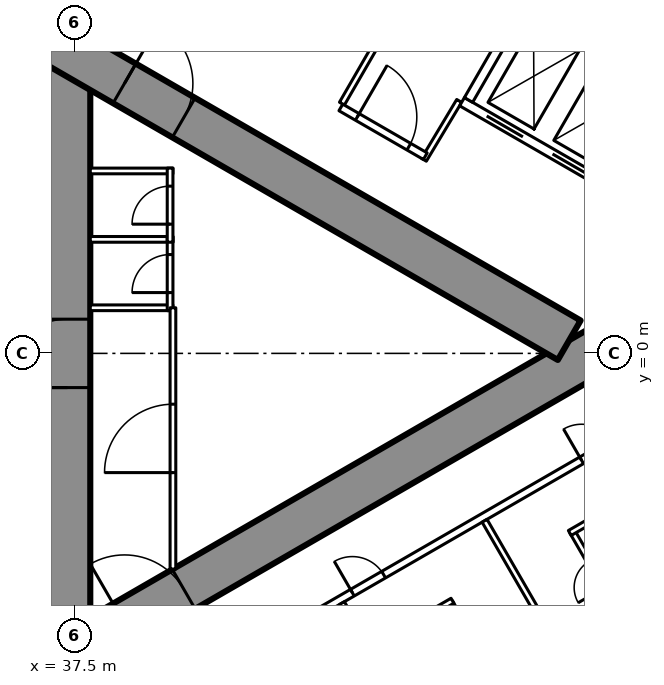
"""IFC4 building model, lengths in metres.
Left out: names, types, materials, properties, quantities, classifications, styles, units other than length and angle.
Written with IfcOpenShell. Run it as: python <this file> out.ifc"""

import sys

from ifc_helpers import new_model, si_unit, direction, frame, frame_2d, origin, place, context, subcontext, project, spatial, rectangle, extrude, element, fill, save


model = new_model("IFC4")
c1 = context("Model", 3, precision=1e-05, world=origin(), true_north=direction((0.0, 1.0)))
c2 = subcontext(c1, "Body", "Model", "MODEL_VIEW")
j1 = project(units=[si_unit("LENGTHUNIT", "METRE"), si_unit("PLANEANGLEUNIT", "RADIAN")], contexts=[c1])
p1 = place(None, origin())
s1 = spatial("IfcSite", under=j1, at=p1, CompositionType="ELEMENT")
p2 = place(p1, origin())
s2 = spatial("IfcBuilding", under=s1, at=p2, CompositionType="ELEMENT")
p3 = place(p2, frame((0.0, 0.0, 194.8)))
s3 = spatial("IfcBuildingStorey", under=s2, at=p3, CompositionType="ELEMENT", Elevation=194.8)
p4 = place(p3, frame((37.3, -8.6, 0.0), z_axis=(0.0, 0.0, 1.0), x_axis=(0.0, 1.0, 0.0)))
e1 = element("IfcWall", 1, at=p4, inside=s3, PredefinedType="SHEAR", context=c2, shape_type="SweptSolid", body=[
    extrude(rectangle(XDim=17.2, YDim=1.2, at=frame_2d((8.6, 0.0))), origin(), (0.0, 0.0, 1.0), 3.5),
])
p5 = place(p4, frame((7.7, 0.0, 0.0)))
e2 = element("IfcOpeningElement", 2, at=p5, cuts=e1, PredefinedType="OPENING", context=c2, shape_type="SweptSolid", body=[
    extrude(rectangle(XDim=1.8, YDim=2.2, at=frame_2d((0.9, 1.1))), frame((0.0, 0.61, 0.0), z_axis=(0.0, -1.0, 0.0), x_axis=(1.0, 0.0, 0.0)), (0.0, 0.0, 1.0), 1.22),
])
p6 = place(p3, frame((27.2, -13.8, 0.0), z_axis=(0.0, 0.0, 1.0), x_axis=(0.866027159892, 0.499996958321, 0.0)))
e3 = element("IfcWall", 3, at=p6, inside=s3, PredefinedType="SHEAR", context=c2, shape_type="SweptSolid", body=[
    extrude(rectangle(XDim=27.947, YDim=1.2, at=frame_2d((13.973, 0.0))), origin(), (0.0, 0.0, 1.0), 3.5),
])
p7 = place(p6, frame((4.6, 0.0, 0.0)))
e4 = element("IfcOpeningElement", 4, at=p7, cuts=e3, PredefinedType="OPENING", context=c2, shape_type="SweptSolid", body=[
    extrude(rectangle(XDim=1.0, YDim=2.2, at=frame_2d((0.5, 1.1))), frame((0.0, 0.61, 0.0), z_axis=(0.0, -1.0, 0.0), x_axis=(1.0, 0.0, 0.0)), (0.0, 0.0, 1.0), 1.22),
])
p8 = place(p6, frame((13.395, 0.0, 0.0)))
e5 = element("IfcOpeningElement", 5, at=p8, cuts=e3, PredefinedType="OPENING", context=c2, shape_type="SweptSolid", body=[
    extrude(rectangle(XDim=1.8, YDim=2.2, at=frame_2d((0.9, 1.1))), frame((0.0, 0.61, 0.0), z_axis=(0.0, -1.0, 0.0), x_axis=(1.0, 0.0, 0.0)), (0.0, 0.0, 1.0), 1.22),
])
p9 = place(p3, frame((27.2, 13.8, 0.0), z_axis=(0.0, 0.0, 1.0), x_axis=(0.866024515034, -0.500001539357, 0.0)))
e6 = element("IfcWall", 6, at=p9, inside=s3, PredefinedType="SHEAR", context=c2, shape_type="SweptSolid", body=[
    extrude(rectangle(XDim=26.907, YDim=1.2, at=frame_2d((13.454, 0.0))), origin(), (0.0, 0.0, 1.0), 3.5),
])
p10 = place(p9, frame((4.6, 0.0, 0.0)))
e7 = element("IfcOpeningElement", 7, at=p10, cuts=e6, PredefinedType="OPENING", context=c2, shape_type="SweptSolid", body=[
    extrude(rectangle(XDim=1.0, YDim=2.2, at=frame_2d((0.5, 1.1))), frame((0.0, 0.61, 0.0), z_axis=(0.0, -1.0, 0.0), x_axis=(1.0, 0.0, 0.0)), (0.0, 0.0, 1.0), 1.22),
])
p11 = place(p9, frame((13.395, 0.0, 0.0)))
e8 = element("IfcOpeningElement", 8, at=p11, cuts=e6, PredefinedType="OPENING", context=c2, shape_type="SweptSolid", body=[
    extrude(rectangle(XDim=1.8, YDim=2.2, at=frame_2d((0.9, 1.1))), frame((0.0, 0.61, 0.0), z_axis=(0.0, -1.0, 0.0), x_axis=(1.0, 0.0, 0.0)), (0.0, 0.0, 1.0), 1.22),
])
p12 = place(p3, frame((27.959, -16.017, 0.0), z_axis=(0.0, 0.0, 1.0), x_axis=(0.866024151371, 0.500002169237, 0.0)))
e9 = element("IfcWall", 9, at=p12, inside=s3, PredefinedType="PARTITIONING", context=c2, shape_type="SweptSolid", body=[
    extrude(rectangle(XDim=32.034, YDim=0.2, at=frame_2d((16.017, 0.0))), origin(), (0.0, 0.0, 1.0), 3.25),
])
p13 = place(p12, frame((0.6, 0.0, 0.0)))
e10 = element("IfcOpeningElement", 10, at=p13, cuts=e9, PredefinedType="OPENING", context=c2, shape_type="SweptSolid", body=[
    extrude(rectangle(XDim=0.95, YDim=2.2, at=frame_2d((0.475, 1.1))), frame((0.0, 0.11, 0.0), z_axis=(0.0, -1.0, 0.0), x_axis=(1.0, 0.0, 0.0)), (0.0, 0.0, 1.0), 0.22),
])
p14 = place(p12, frame((13.132, 0.0, 0.0)))
e11 = element("IfcOpeningElement", 11, at=p14, cuts=e9, PredefinedType="OPENING", context=c2, shape_type="SweptSolid", body=[
    extrude(rectangle(XDim=0.95, YDim=2.2, at=frame_2d((0.475, 1.1))), frame((0.0, 0.11, 0.0), z_axis=(0.0, -1.0, 0.0), x_axis=(1.0, 0.0, 0.0)), (0.0, 0.0, 1.0), 0.22),
])
p15 = place(p12, frame((15.391, 0.0, 0.0)))
e12 = element("IfcOpeningElement", 12, at=p15, cuts=e9, PredefinedType="OPENING", context=c2, shape_type="SweptSolid", body=[
    extrude(rectangle(XDim=0.95, YDim=2.2, at=frame_2d((0.475, 1.1))), frame((0.0, 0.11, 0.0), z_axis=(0.0, -1.0, 0.0), x_axis=(1.0, 0.0, 0.0)), (0.0, 0.0, 1.0), 0.22),
])
p16 = place(p12, frame((19.441, 0.0, 0.0)))
e13 = element("IfcOpeningElement", 13, at=p16, cuts=e9, PredefinedType="OPENING", context=c2, shape_type="SweptSolid", body=[
    extrude(rectangle(XDim=0.95, YDim=2.2, at=frame_2d((0.475, 1.1))), frame((0.0, 0.11, 0.0), z_axis=(0.0, -1.0, 0.0), x_axis=(1.0, 0.0, 0.0)), (0.0, 0.0, 1.0), 0.22),
])
p17 = place(p12, frame((26.406, 0.0, 0.0)))
e14 = element("IfcOpeningElement", 14, at=p17, cuts=e9, PredefinedType="OPENING", context=c2, shape_type="SweptSolid", body=[
    extrude(rectangle(XDim=0.95, YDim=2.2, at=frame_2d((0.475, 1.1))), frame((0.0, 0.11, 0.0), z_axis=(0.0, -1.0, 0.0), x_axis=(1.0, 0.0, 0.0)), (0.0, 0.0, 1.0), 0.22),
])
p18 = place(p12, frame((28.87, 0.0, 0.0)))
e15 = element("IfcOpeningElement", 15, at=p18, cuts=e9, PredefinedType="OPENING", context=c2, shape_type="SweptSolid", body=[
    extrude(rectangle(XDim=1.8, YDim=2.2, at=frame_2d((0.9, 1.1))), frame((0.0, 0.11, 0.0), z_axis=(0.0, -1.0, 0.0), x_axis=(1.0, 0.0, 0.0)), (0.0, 0.0, 1.0), 0.22),
])
p19 = place(p3, frame((44.521, -6.571, 0.0), z_axis=(0.0, 0.0, 1.0), x_axis=(0.500010457486, -0.866019366068, 0.0)))
e16 = element("IfcWall", 16, at=p19, inside=s3, PredefinedType="PARTITIONING", context=c2, shape_type="SweptSolid", body=[
    extrude(rectangle(XDim=10.126, YDim=0.15, at=frame_2d((5.063, 0.0))), origin(), (0.0, 0.0, 1.0), 3.25),
])
p20 = place(p3, frame((48.275, -4.404, 0.0), z_axis=(0.0, 0.0, 1.0), x_axis=(0.500006004368, -0.866021937133, 0.0)))
e17 = element("IfcWall", 17, at=p20, inside=s3, PredefinedType="PARTITIONING", context=c2, shape_type="SweptSolid", body=[
    extrude(rectangle(XDim=7.279, YDim=0.15, at=frame_2d((3.64, 0.0))), origin(), (0.0, 0.0, 1.0), 2.3),
])
p21 = place(p3, frame((44.521, 6.571, 0.0), z_axis=(0.0, 0.0, 1.0), x_axis=(0.500020376429, 0.866013639128, 0.0)))
e18 = element("IfcWall", 18, at=p21, inside=s3, PredefinedType="PARTITIONING", context=c2, shape_type="SweptSolid", body=[
    extrude(rectangle(XDim=7.306, YDim=0.15, at=frame_2d((3.653, 0.0))), origin(), (0.0, 0.0, 1.0), 2.3),
])
p22 = place(p3, frame((47.606, 6.643, 0.0), z_axis=(0.0, 0.0, 1.0), x_axis=(-0.514237157483, -0.857648031458, 0.0)))
e19 = element("IfcWall", 19, at=p22, inside=s3, PredefinedType="PARTITIONING", context=c2, shape_type="SweptSolid", body=[
    extrude(rectangle(XDim=1.805, YDim=0.15, at=frame_2d((0.902, 0.0))), origin(), (0.0, 0.0, 1.0), 3.25),
])
p23 = place(p3, frame((44.493, 6.472, 0.0), z_axis=(0.0, 0.0, 1.0), x_axis=(0.866027140358, -0.499996992154, 0.0)))
e20 = element("IfcWall", 20, at=p23, inside=s3, PredefinedType="PARTITIONING", context=c2, shape_type="SweptSolid", body=[
    extrude(rectangle(XDim=2.566, YDim=0.2, at=frame_2d((1.283, 0.0))), origin(), (0.0, 0.0, 1.0), 3.25),
])
p24 = place(p23, frame((0.5, 0.0, 0.0)))
e21 = element("IfcOpeningElement", 21, at=p24, cuts=e20, PredefinedType="OPENING", context=c2, shape_type="SweptSolid", body=[
    extrude(rectangle(XDim=1.566, YDim=2.2, at=frame_2d((0.783, 1.1))), frame((0.0, 0.11, 0.0), z_axis=(0.0, -1.0, 0.0), x_axis=(1.0, 0.0, 0.0)), (0.0, 0.0, 1.0), 0.22),
])
p25 = place(p3, frame((47.365, -6.546, 0.0), z_axis=(0.0, 0.0, 1.0), x_axis=(0.500006934395, -0.866021400173, 0.0)))
e22 = element("IfcWall", 22, at=p25, inside=s3, PredefinedType="PARTITIONING", context=c2, shape_type="SweptSolid", body=[
    extrude(rectangle(XDim=2.6, YDim=0.15, at=frame_2d((1.3, 0.0))), origin(), (0.0, 0.0, 1.0), 3.25),
])
p26 = place(p25, frame((0.9, 0.0, 0.0)))
e23 = element("IfcOpeningElement", 23, at=p26, cuts=e22, PredefinedType="OPENING", context=c2, shape_type="SweptSolid", body=[
    extrude(rectangle(XDim=0.8, YDim=2.2, at=frame_2d((0.4, 1.1))), frame((0.0, 0.085, 0.0), z_axis=(0.0, -1.0, 0.0), x_axis=(1.0, 0.0, 0.0)), (0.0, 0.0, 1.0), 0.17),
])
p27 = place(p3, frame((45.286, -7.746, 0.0), z_axis=(0.0, 0.0, 1.0), x_axis=(0.866006523861, 0.500032699561, 0.0)))
e24 = element("IfcWall", 24, at=p27, inside=s3, PredefinedType="PARTITIONING", context=c2, shape_type="SweptSolid", body=[
    extrude(rectangle(XDim=2.475, YDim=0.15, at=frame_2d((1.237, 0.0))), origin(), (0.0, 0.0, 1.0), 3.25),
])
p28 = place(p3, frame((50.582, -4.688, 0.0), z_axis=(0.0, 0.0, 1.0), x_axis=(0.500006934395, -0.866021400173, 0.0)))
e25 = element("IfcWall", 25, at=p28, inside=s3, PredefinedType="PARTITIONING", context=c2, shape_type="SweptSolid", body=[
    extrude(rectangle(XDim=2.6, YDim=0.15, at=frame_2d((1.3, 0.0))), origin(), (0.0, 0.0, 1.0), 3.25),
])
p29 = place(p28, frame((0.9, 0.0, 0.0)))
e26 = element("IfcOpeningElement", 26, at=p29, cuts=e25, PredefinedType="OPENING", context=c2, shape_type="SweptSolid", body=[
    extrude(rectangle(XDim=0.8, YDim=2.2, at=frame_2d((0.4, 1.1))), frame((0.0, 0.085, 0.0), z_axis=(0.0, -1.0, 0.0), x_axis=(1.0, 0.0, 0.0)), (0.0, 0.0, 1.0), 0.17),
])
p30 = place(p3, frame((50.517, -4.726, 0.0), z_axis=(0.0, 0.0, 1.0), x_axis=(0.866031185235, 0.4999899861, 0.0)))
e27 = element("IfcWall", 27, at=p30, inside=s3, PredefinedType="PARTITIONING", context=c2, shape_type="SweptSolid", body=[
    extrude(rectangle(XDim=2.475, YDim=0.15, at=frame_2d((1.238, 0.0))), origin(), (0.0, 0.0, 1.0), 3.25),
])
for number, where, z_axis, x_axis in (
    (28, (37.9, 1.2, 0.0), (0.0, 0.0, 1.0), (1.0, 0.0, 0.0)),
    (29, (37.9, 3.0, 0.0), (0.0, 0.0, 1.0), (1.0, 0.0, 0.0)),
    (30, (37.9, 4.8, 0.0), (0.0, 0.0, 1.0), (1.0, 0.0, 0.0)),
):
    element("IfcWall", number, at=place(p3, frame(where, z_axis=z_axis, x_axis=x_axis)), inside=s3, PredefinedType="PARTITIONING", context=c2, shape_type="SweptSolid", body=[
        extrude(rectangle(XDim=2.175, YDim=0.15, at=frame_2d((1.087, 0.0))), origin(), (0.0, 0.0, 1.0), 3.25),
    ])
p31 = place(p3, frame((40.0, 1.125, 0.0), z_axis=(0.0, 0.0, 1.0), x_axis=(0.0, 1.0, 0.0)))
e31 = element("IfcWall", 31, at=p31, inside=s3, PredefinedType="PARTITIONING", context=c2, shape_type="SweptSolid", body=[
    extrude(rectangle(XDim=1.95, YDim=0.15, at=frame_2d((0.975, 0.0))), origin(), (0.0, 0.0, 1.0), 3.25),
])
p32 = place(p31, frame((0.475, 0.0, 0.0)))
e32 = element("IfcOpeningElement", 32, at=p32, cuts=e31, PredefinedType="OPENING", context=c2, shape_type="SweptSolid", body=[
    extrude(rectangle(XDim=1.0, YDim=2.2, at=frame_2d((0.5, 1.1))), frame((0.0, 0.085, 0.0), z_axis=(0.0, -1.0, 0.0), x_axis=(1.0, 0.0, 0.0)), (0.0, 0.0, 1.0), 0.17),
])
p33 = place(p3, frame((40.0, 2.925, 0.0), z_axis=(0.0, 0.0, 1.0), x_axis=(0.0, 1.0, 0.0)))
e33 = element("IfcWall", 33, at=p33, inside=s3, PredefinedType="PARTITIONING", context=c2, shape_type="SweptSolid", body=[
    extrude(rectangle(XDim=1.95, YDim=0.15, at=frame_2d((0.975, 0.0))), origin(), (0.0, 0.0, 1.0), 3.25),
])
p34 = place(p33, frame((0.475, 0.0, 0.0)))
e34 = element("IfcOpeningElement", 34, at=p34, cuts=e33, PredefinedType="OPENING", context=c2, shape_type="SweptSolid", body=[
    extrude(rectangle(XDim=1.0, YDim=2.2, at=frame_2d((0.5, 1.1))), frame((0.0, 0.085, 0.0), z_axis=(0.0, -1.0, 0.0), x_axis=(1.0, 0.0, 0.0)), (0.0, 0.0, 1.0), 0.17),
])
p35 = place(p3, frame((40.075, -5.674, 0.0), z_axis=(0.0, 0.0, 1.0), x_axis=(0.0, 1.0, 0.0)))
e35 = element("IfcWall", 35, at=p35, inside=s3, PredefinedType="PARTITIONING", context=c2, shape_type="SweptSolid", body=[
    extrude(rectangle(XDim=6.874, YDim=0.15, at=frame_2d((3.437, 0.0))), origin(), (0.0, 0.0, 1.0), 3.25),
])
p36 = place(p35, frame((2.537, 0.0, 0.0)))
e36 = element("IfcOpeningElement", 36, at=p36, cuts=e35, PredefinedType="OPENING", context=c2, shape_type="SweptSolid", body=[
    extrude(rectangle(XDim=1.8, YDim=2.2, at=frame_2d((0.9, 1.1))), frame((0.0, 0.085, 0.0), z_axis=(0.0, -1.0, 0.0), x_axis=(1.0, 0.0, 0.0)), (0.0, 0.0, 1.0), 0.17),
])
p37 = place(p3, frame((47.681, 6.622, 0.0), z_axis=(0.0, 0.0, 1.0), x_axis=(0.86603344179, -0.499986077507, 0.0)))
e37 = element("IfcWall", 37, at=p37, inside=s3, PredefinedType="PARTITIONING", context=c2, shape_type="SweptSolid", body=[
    extrude(rectangle(XDim=6.6, YDim=0.25, at=frame_2d((3.3, 0.0))), origin(), (0.0, 0.0, 1.0), 3.25),
])
p38 = place(p37, frame((0.75, 0.0, 0.0)))
e38 = element("IfcOpeningElement", 38, at=p38, cuts=e37, PredefinedType="OPENING", context=c2, shape_type="SweptSolid", body=[
    extrude(rectangle(XDim=1.1, YDim=2.2, at=frame_2d((0.55, 1.1))), frame((0.0, 0.135, 0.0), z_axis=(0.0, -1.0, 0.0), x_axis=(1.0, 0.0, 0.0)), (0.0, 0.0, 1.0), 0.27),
])
p39 = place(p37, frame((2.75, 0.0, 0.0)))
e39 = element("IfcOpeningElement", 39, at=p39, cuts=e37, PredefinedType="OPENING", context=c2, shape_type="SweptSolid", body=[
    extrude(rectangle(XDim=1.1, YDim=2.2, at=frame_2d((0.55, 1.1))), frame((0.0, 0.135, 0.0), z_axis=(0.0, -1.0, 0.0), x_axis=(1.0, 0.0, 0.0)), (0.0, 0.0, 1.0), 0.27),
])
p40 = place(p37, frame((4.75, 0.0, 0.0)))
e40 = element("IfcOpeningElement", 40, at=p40, cuts=e37, PredefinedType="OPENING", context=c2, shape_type="SweptSolid", body=[
    extrude(rectangle(XDim=1.1, YDim=2.2, at=frame_2d((0.55, 1.1))), frame((0.0, 0.135, 0.0), z_axis=(0.0, -1.0, 0.0), x_axis=(1.0, 0.0, 0.0)), (0.0, 0.0, 1.0), 0.27),
])
p41 = place(p3, frame((49.406, 9.611, 0.0), z_axis=(0.0, 0.0, 1.0), x_axis=(0.86603344179, -0.499986077507, 0.0)))
e41 = element("IfcWall", 41, at=p41, inside=s3, PredefinedType="PARTITIONING", context=c2, shape_type="SweptSolid", body=[
    extrude(rectangle(XDim=6.6, YDim=0.25, at=frame_2d((3.3, 0.0))), origin(), (0.0, 0.0, 1.0), 3.25),
])
p42 = place(p3, frame((47.852, 6.668, 0.0), z_axis=(0.0, 0.0, 1.0), x_axis=(0.499929347863, 0.866066190972, 0.0)))
e42 = element("IfcWall", 42, at=p42, inside=s3, PredefinedType="PARTITIONING", context=c2, shape_type="SweptSolid", body=[
    extrude(rectangle(XDim=3.201, YDim=0.25, at=frame_2d((1.6, 0.0))), origin(), (0.0, 0.0, 1.0), 3.25),
])
p43 = place(p16, origin())
e43 = element("IfcDoor", 43, at=p43, inside=s3, OperationType="SINGLE_SWING_LEFT", PredefinedType="DOOR", context=c2, shape_type="SweptSolid", body=[
    extrude(rectangle(XDim=0.95, YDim=2.2, at=frame_2d((0.475, 1.1))), frame((0.0, 0.025, 0.0), z_axis=(0.0, -1.0, 0.0), x_axis=(1.0, 0.0, 0.0)), (0.0, 0.0, 1.0), 0.05),
])
fill(e13, e43)
p44 = place(p17, origin())
e44 = element("IfcDoor", 44, at=p44, inside=s3, OperationType="SINGLE_SWING_LEFT", PredefinedType="DOOR", context=c2, shape_type="SweptSolid", body=[
    extrude(rectangle(XDim=0.95, YDim=2.2, at=frame_2d((0.475, 1.1))), frame((0.0, 0.025, 0.0), z_axis=(0.0, -1.0, 0.0), x_axis=(1.0, 0.0, 0.0)), (0.0, 0.0, 1.0), 0.05),
])
fill(e14, e44)
p45 = place(p24, origin())
e45 = element("IfcDoor", 45, at=p45, inside=s3, OperationType="SINGLE_SWING_LEFT", PredefinedType="DOOR", context=c2, shape_type="SweptSolid", body=[
    extrude(rectangle(XDim=1.566, YDim=2.2, at=frame_2d((0.783, 1.1))), frame((0.0, 0.025, 0.0), z_axis=(0.0, -1.0, 0.0), x_axis=(1.0, 0.0, 0.0)), (0.0, 0.0, 1.0), 0.05),
])
fill(e21, e45)
p46 = place(p32, origin())
e46 = element("IfcDoor", 46, at=p46, inside=s3, OperationType="SINGLE_SWING_LEFT", PredefinedType="DOOR", context=c2, shape_type="SweptSolid", body=[
    extrude(rectangle(XDim=1.0, YDim=2.2, at=frame_2d((0.5, 1.1))), frame((0.0, 0.025, 0.0), z_axis=(0.0, -1.0, 0.0), x_axis=(1.0, 0.0, 0.0)), (0.0, 0.0, 1.0), 0.05),
])
fill(e32, e46)
p47 = place(p34, origin())
e47 = element("IfcDoor", 47, at=p47, inside=s3, OperationType="SINGLE_SWING_LEFT", PredefinedType="DOOR", context=c2, shape_type="SweptSolid", body=[
    extrude(rectangle(XDim=1.0, YDim=2.2, at=frame_2d((0.5, 1.1))), frame((0.0, 0.025, 0.0), z_axis=(0.0, -1.0, 0.0), x_axis=(1.0, 0.0, 0.0)), (0.0, 0.0, 1.0), 0.05),
])
fill(e34, e47)
p48 = place(p36, origin())
e48 = element("IfcDoor", 48, at=p48, inside=s3, OperationType="DOUBLE_DOOR_SINGLE_SWING", PredefinedType="DOOR", context=c2, shape_type="SweptSolid", body=[
    extrude(rectangle(XDim=1.8, YDim=2.2, at=frame_2d((0.9, 1.1))), frame((0.0, 0.025, 0.0), z_axis=(0.0, -1.0, 0.0), x_axis=(1.0, 0.0, 0.0)), (0.0, 0.0, 1.0), 0.05),
])
fill(e36, e48)
p49 = place(p8, origin())
e49 = element("IfcDoor", 49, at=p49, inside=s3, OperationType="DOUBLE_DOOR_SINGLE_SWING", PredefinedType="DOOR", context=c2, shape_type="SweptSolid", body=[
    extrude(rectangle(XDim=1.8, YDim=2.2, at=frame_2d((0.9, 1.1))), frame((0.0, 0.025, 0.0), z_axis=(0.0, -1.0, 0.0), x_axis=(1.0, 0.0, 0.0)), (0.0, 0.0, 1.0), 0.05),
])
fill(e5, e49)
p50 = place(p11, origin())
e50 = element("IfcDoor", 50, at=p50, inside=s3, OperationType="DOUBLE_DOOR_SINGLE_SWING", PredefinedType="DOOR", context=c2, shape_type="SweptSolid", body=[
    extrude(rectangle(XDim=1.8, YDim=2.2, at=frame_2d((0.9, 1.1))), frame((0.0, 0.025, 0.0), z_axis=(0.0, -1.0, 0.0), x_axis=(1.0, 0.0, 0.0)), (0.0, 0.0, 1.0), 0.05),
])
fill(e8, e50)
p51 = place(p5, origin())
e51 = element("IfcDoor", 51, at=p51, inside=s3, OperationType="DOUBLE_DOOR_SINGLE_SWING", PredefinedType="DOOR", context=c2, shape_type="SweptSolid", body=[
    extrude(rectangle(XDim=1.8, YDim=2.2, at=frame_2d((0.9, 1.1))), frame((0.0, 0.025, 0.0), z_axis=(0.0, -1.0, 0.0), x_axis=(1.0, 0.0, 0.0)), (0.0, 0.0, 1.0), 0.05),
])
fill(e2, e51)
p52 = place(p38, origin())
e52 = element("IfcDoor", 52, at=p52, inside=s3, OperationType="DOUBLE_DOOR_SLIDING", PredefinedType="USERDEFINED", context=c2, shape_type="SweptSolid", body=[
    extrude(rectangle(XDim=1.1, YDim=2.2, at=frame_2d((0.55, 1.1))), frame((0.0, 0.025, 0.0), z_axis=(0.0, -1.0, 0.0), x_axis=(1.0, 0.0, 0.0)), (0.0, 0.0, 1.0), 0.05),
])
fill(e38, e52)
p53 = place(p39, origin())
e53 = element("IfcDoor", 53, at=p53, inside=s3, OperationType="DOUBLE_DOOR_SLIDING", PredefinedType="USERDEFINED", context=c2, shape_type="SweptSolid", body=[
    extrude(rectangle(XDim=1.1, YDim=2.2, at=frame_2d((0.55, 1.1))), frame((0.0, 0.025, 0.0), z_axis=(0.0, -1.0, 0.0), x_axis=(1.0, 0.0, 0.0)), (0.0, 0.0, 1.0), 0.05),
])
fill(e39, e53)
save(model, sys.argv[1])
